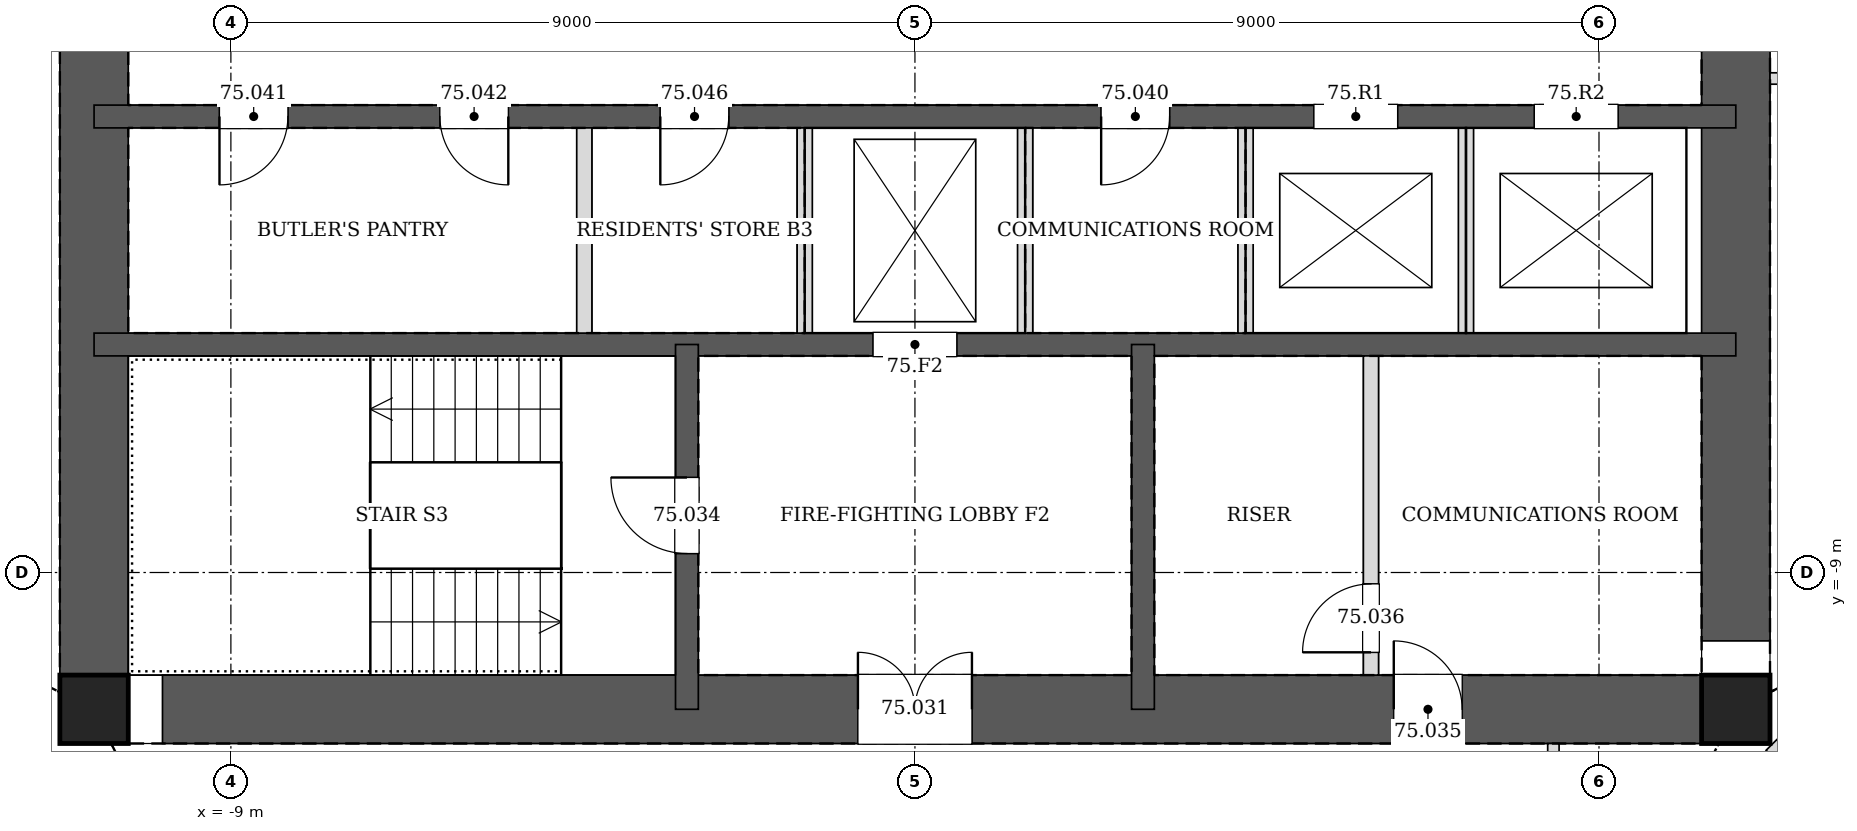
"""IFC4 building model, lengths in metres.
Left out: names, types, materials, properties, quantities, classifications, styles, units other than length and angle.
Written with IfcOpenShell. Run it as: python <this file> out.ifc"""

import sys

from ifc_helpers import new_model, si_unit, direction, frame, frame_2d, origin, origin_2d, place, context, subcontext, project, spatial, rectangle, hollow_rectangle, extrude, element, fill, save


model = new_model("IFC4")
c1 = context("Model", 3, precision=1e-05, world=origin(), true_north=direction((0.0, 1.0)))
c2 = subcontext(c1, "Body", "Model", "MODEL_VIEW")
j1 = project(units=[si_unit("LENGTHUNIT", "METRE"), si_unit("PLANEANGLEUNIT", "RADIAN")], contexts=[c1])
p1 = place(None, origin())
s1 = spatial("IfcSite", under=j1, at=p1, CompositionType="ELEMENT")
p2 = place(p1, origin())
s2 = spatial("IfcBuilding", under=s1, at=p2, CompositionType="ELEMENT")
p3 = place(p2, frame((0.0, 0.0, 304.8)))
s3 = spatial("IfcBuildingStorey", under=s2, at=p3, CompositionType="ELEMENT", Elevation=304.8)
for number, where, z_axis, x_axis in (
    (1, (-10.8, -10.8, 0.0), (0.0, 0.0, 1.0), (1.0, 0.0, 0.0)),
    (2, (10.8, -10.8, 0.0), (0.0, 0.0, 1.0), (1.0, 0.0, 0.0)),
):
    element("IfcColumn", number, at=place(p3, frame(where, z_axis=z_axis, x_axis=x_axis)), inside=s3, PredefinedType="COLUMN", context=c2, shape_type="SweptSolid", body=[
        extrude(hollow_rectangle(XDim=0.9, YDim=0.9, WallThickness=0.04, at=origin_2d()), origin(), (0.0, 0.0, 1.0), 3.4),
    ])
p4 = place(p3, frame((-10.8, -10.8, 0.0), z_axis=(0.0, 0.0, 1.0), x_axis=(1.0, 0.0, 0.0)))
e3 = element("IfcWall", 3, at=p4, inside=s3, PredefinedType="SOLIDWALL", context=c2, shape_type="SweptSolid", body=[
    extrude(rectangle(XDim=21.6, YDim=0.9, at=frame_2d((10.8, 0.0))), origin(), (0.0, 0.0, 1.0), 3.4),
])
p5 = place(p4, frame((10.05, 0.0, 0.0)))
e4 = element("IfcOpeningElement", 4, at=p5, cuts=e3, PredefinedType="OPENING", context=c2, shape_type="SweptSolid", body=[
    extrude(rectangle(XDim=1.5, YDim=2.1, at=frame_2d((0.75, 1.05))), frame((0.0, 0.46, 0.0), z_axis=(0.0, -1.0, 0.0), x_axis=(1.0, 0.0, 0.0)), (0.0, 0.0, 1.0), 0.92),
])
p6 = place(p4, frame((17.1, 0.0, 0.0)))
e5 = element("IfcOpeningElement", 5, at=p6, cuts=e3, PredefinedType="OPENING", context=c2, shape_type="SweptSolid", body=[
    extrude(rectangle(XDim=0.9, YDim=2.1, at=frame_2d((0.45, 1.05))), frame((0.0, 0.46, 0.0), z_axis=(0.0, -1.0, 0.0), x_axis=(1.0, 0.0, 0.0)), (0.0, 0.0, 1.0), 0.92),
])
p7 = place(p3, frame((10.8, -10.8, 0.0), z_axis=(0.0, 0.0, 1.0), x_axis=(0.0, 1.0, 0.0)))
e6 = element("IfcWall", 6, at=p7, inside=s3, PredefinedType="SOLIDWALL", context=c2, shape_type="SweptSolid", body=[
    extrude(rectangle(XDim=21.6, YDim=0.9, at=frame_2d((10.8, 0.0))), origin(), (0.0, 0.0, 1.0), 3.4),
])
p8 = place(p7, frame((11.7, 0.0, 0.0)))
e7 = element("IfcOpeningElement", 7, at=p8, cuts=e6, PredefinedType="OPENING", context=c2, shape_type="SweptSolid", body=[
    extrude(rectangle(XDim=1.2, YDim=2.1, at=frame_2d((0.6, 1.05))), frame((0.0, 0.46, 0.0), z_axis=(0.0, -1.0, 0.0), x_axis=(1.0, 0.0, 0.0)), (0.0, 0.0, 1.0), 0.92),
])
p9 = place(p7, frame((8.7, 0.0, 0.0)))
e8 = element("IfcOpeningElement", 8, at=p9, cuts=e6, PredefinedType="OPENING", context=c2, shape_type="SweptSolid", body=[
    extrude(rectangle(XDim=1.2, YDim=2.1, at=frame_2d((0.6, 1.05))), frame((0.0, 0.46, 0.0), z_axis=(0.0, -1.0, 0.0), x_axis=(1.0, 0.0, 0.0)), (0.0, 0.0, 1.0), 0.92),
])
p10 = place(p3, frame((-10.8, 10.8, 0.0), z_axis=(0.0, 0.0, 1.0), x_axis=(0.0, -1.0, 0.0)))
e9 = element("IfcWall", 9, at=p10, inside=s3, PredefinedType="SOLIDWALL", context=c2, shape_type="SweptSolid", body=[
    extrude(rectangle(XDim=21.6, YDim=0.9, at=frame_2d((10.8, 0.0))), origin(), (0.0, 0.0, 1.0), 3.4),
])
p11 = place(p10, frame((8.7, 0.0, 0.0)))
e10 = element("IfcOpeningElement", 10, at=p11, cuts=e9, PredefinedType="OPENING", context=c2, shape_type="SweptSolid", body=[
    extrude(rectangle(XDim=1.2, YDim=2.1, at=frame_2d((0.6, 1.05))), frame((0.0, 0.46, 0.0), z_axis=(0.0, -1.0, 0.0), x_axis=(1.0, 0.0, 0.0)), (0.0, 0.0, 1.0), 0.92),
])
p12 = place(p10, frame((11.7, 0.0, 0.0)))
e11 = element("IfcOpeningElement", 11, at=p12, cuts=e9, PredefinedType="OPENING", context=c2, shape_type="SweptSolid", body=[
    extrude(rectangle(XDim=1.2, YDim=2.1, at=frame_2d((0.6, 1.05))), frame((0.0, 0.46, 0.0), z_axis=(0.0, -1.0, 0.0), x_axis=(1.0, 0.0, 0.0)), (0.0, 0.0, 1.0), 0.92),
])
p13 = place(p3, frame((-10.8, -3.0, 0.0), z_axis=(0.0, 0.0, 1.0), x_axis=(1.0, 0.0, 0.0)))
e12 = element("IfcWall", 12, at=p13, inside=s3, PredefinedType="SOLIDWALL", context=c2, shape_type="SweptSolid", body=[
    extrude(rectangle(XDim=21.6, YDim=0.3, at=frame_2d((10.8, 0.0))), origin(), (0.0, 0.0, 1.0), 3.4),
])
p14 = place(p13, frame((13.25, 0.0, 0.0)))
e13 = element("IfcOpeningElement", 13, at=p14, cuts=e12, PredefinedType="OPENING", context=c2, shape_type="SweptSolid", body=[
    extrude(rectangle(XDim=0.9, YDim=2.1, at=frame_2d((0.45, 1.05))), frame((0.0, 0.16, 0.0), z_axis=(0.0, -1.0, 0.0), x_axis=(1.0, 0.0, 0.0)), (0.0, 0.0, 1.0), 0.32),
])
p15 = place(p13, frame((1.65, 0.0, 0.0)))
e14 = element("IfcOpeningElement", 14, at=p15, cuts=e12, PredefinedType="OPENING", context=c2, shape_type="SweptSolid", body=[
    extrude(rectangle(XDim=0.9, YDim=2.1, at=frame_2d((0.45, 1.05))), frame((0.0, 0.16, 0.0), z_axis=(0.0, -1.0, 0.0), x_axis=(1.0, 0.0, 0.0)), (0.0, 0.0, 1.0), 0.32),
])
p16 = place(p13, frame((4.55, 0.0, 0.0)))
e15 = element("IfcOpeningElement", 15, at=p16, cuts=e12, PredefinedType="OPENING", context=c2, shape_type="SweptSolid", body=[
    extrude(rectangle(XDim=0.9, YDim=2.1, at=frame_2d((0.45, 1.05))), frame((0.0, 0.16, 0.0), z_axis=(0.0, -1.0, 0.0), x_axis=(1.0, 0.0, 0.0)), (0.0, 0.0, 1.0), 0.32),
])
p17 = place(p13, frame((7.45, 0.0, 0.0)))
e16 = element("IfcOpeningElement", 16, at=p17, cuts=e12, PredefinedType="OPENING", context=c2, shape_type="SweptSolid", body=[
    extrude(rectangle(XDim=0.9, YDim=2.1, at=frame_2d((0.45, 1.05))), frame((0.0, 0.16, 0.0), z_axis=(0.0, -1.0, 0.0), x_axis=(1.0, 0.0, 0.0)), (0.0, 0.0, 1.0), 0.32),
])
p18 = place(p13, frame((16.05, 0.0, 0.0)))
e17 = element("IfcOpeningElement", 17, at=p18, cuts=e12, PredefinedType="OPENING", context=c2, shape_type="SweptSolid", body=[
    extrude(rectangle(XDim=1.1, YDim=2.1, at=frame_2d((0.55, 1.05))), frame((0.0, 0.16, 0.0), z_axis=(0.0, -1.0, 0.0), x_axis=(1.0, 0.0, 0.0)), (0.0, 0.0, 1.0), 0.32),
])
p19 = place(p13, frame((18.95, 0.0, 0.0)))
e18 = element("IfcOpeningElement", 18, at=p19, cuts=e12, PredefinedType="OPENING", context=c2, shape_type="SweptSolid", body=[
    extrude(rectangle(XDim=1.1, YDim=2.1, at=frame_2d((0.55, 1.05))), frame((0.0, 0.16, 0.0), z_axis=(0.0, -1.0, 0.0), x_axis=(1.0, 0.0, 0.0)), (0.0, 0.0, 1.0), 0.32),
])
p20 = place(p3, frame((-10.8, -6.0, 0.0), z_axis=(0.0, 0.0, 1.0), x_axis=(1.0, 0.0, 0.0)))
e19 = element("IfcWall", 19, at=p20, inside=s3, PredefinedType="SOLIDWALL", context=c2, shape_type="SweptSolid", body=[
    extrude(rectangle(XDim=21.6, YDim=0.3, at=frame_2d((10.8, 0.0))), origin(), (0.0, 0.0, 1.0), 3.4),
])
p21 = place(p20, frame((10.25, 0.0, 0.0)))
e20 = element("IfcOpeningElement", 20, at=p21, cuts=e19, PredefinedType="OPENING", context=c2, shape_type="SweptSolid", body=[
    extrude(rectangle(XDim=1.1, YDim=2.1, at=frame_2d((0.55, 1.05))), frame((0.0, 0.16, 0.0), z_axis=(0.0, -1.0, 0.0), x_axis=(1.0, 0.0, 0.0)), (0.0, 0.0, 1.0), 0.32),
])
p22 = place(p3, frame((-3.0, -6.0, 0.0), z_axis=(0.0, 0.0, 1.0), x_axis=(0.0, -1.0, 0.0)))
e21 = element("IfcWall", 21, at=p22, inside=s3, PredefinedType="SOLIDWALL", context=c2, shape_type="SweptSolid", body=[
    extrude(rectangle(XDim=4.8, YDim=0.3, at=frame_2d((2.4, 0.0))), origin(), (0.0, 0.0, 1.0), 3.4),
])
p23 = place(p22, frame((1.75, 0.0, 0.0)))
e22 = element("IfcOpeningElement", 22, at=p23, cuts=e21, PredefinedType="OPENING", context=c2, shape_type="SweptSolid", body=[
    extrude(rectangle(XDim=1.0, YDim=2.1, at=frame_2d((0.5, 1.05))), frame((0.0, 0.16, 0.0), z_axis=(0.0, -1.0, 0.0), x_axis=(1.0, 0.0, 0.0)), (0.0, 0.0, 1.0), 0.32),
])
p24 = place(p3, frame((3.0, -6.0, 0.0), z_axis=(0.0, 0.0, 1.0), x_axis=(0.0, -1.0, 0.0)))
e23 = element("IfcWall", 23, at=p24, inside=s3, PredefinedType="SOLIDWALL", context=c2, shape_type="SweptSolid", body=[
    extrude(rectangle(XDim=4.8, YDim=0.3, at=frame_2d((2.4, 0.0))), origin(), (0.0, 0.0, 1.0), 3.4),
])
for number, where, z_axis, x_axis in (
    (24, (11.25, -2.5, 0.0), (0.0, 0.0, 1.0), (1.0, 0.0, 0.0)),
    (25, (8.4, -12.9, 0.0), (0.0, 0.0, 1.0), (0.0, 1.0, 0.0)),
):
    element("IfcWall", number, at=place(p3, frame(where, z_axis=z_axis, x_axis=x_axis)), inside=s3, PredefinedType="PARTITIONING", context=c2, shape_type="SweptSolid", body=[
        extrude(rectangle(XDim=1.65, YDim=0.15, at=frame_2d((0.825, 0.0))), origin(), (0.0, 0.0, 1.0), 3.2),
    ])
p25 = place(p3, frame((11.269, -11.269, 0.0), z_axis=(0.0, 0.0, 1.0), x_axis=(0.707106781187, -0.707106781187, 0.0)))
e26 = element("IfcWall", 26, at=p25, inside=s3, PredefinedType="PARTITIONING", context=c2, shape_type="SweptSolid", body=[
    extrude(rectangle(XDim=2.315, YDim=0.2, at=frame_2d((1.158, 0.0))), origin(), (0.0, 0.0, 1.0), 2.591),
])
for number, where, z_axis, x_axis in (
    (27, (-4.35, -5.85, 0.0), (0.0, 0.0, 1.0), (0.0, 1.0, 0.0)),
    (28, (-1.45, -5.85, 0.0), (0.0, 0.0, 1.0), (0.0, 1.0, 0.0)),
    (29, (1.45, -5.85, 0.0), (0.0, 0.0, 1.0), (0.0, 1.0, 0.0)),
    (30, (4.35, -5.85, 0.0), (0.0, 0.0, 1.0), (0.0, 1.0, 0.0)),
):
    element("IfcWall", number, at=place(p3, frame(where, z_axis=z_axis, x_axis=x_axis)), inside=s3, PredefinedType="PARTITIONING", context=c2, shape_type="SweptSolid", body=[
        extrude(rectangle(XDim=2.7, YDim=0.2, at=frame_2d((1.35, 0.0))), origin(), (0.0, 0.0, 1.0), 3.2),
    ])
p26 = place(p3, frame((7.25, -5.85, 0.0), z_axis=(0.0, 0.0, 1.0), x_axis=(0.0, 1.0, 0.0)))
e31 = element("IfcWall", 31, at=p26, inside=s3, PredefinedType="PARTITIONING", context=c2, shape_type="SweptSolid", body=[
    extrude(rectangle(XDim=2.7, YDim=0.2, at=frame_2d((1.35, 0.0))), origin(), (0.0, 0.0, 1.0), 3.4),
])
p27 = place(p3, frame((6.0, -10.35, 0.0), z_axis=(0.0, 0.0, 1.0), x_axis=(0.0, 1.0, 0.0)))
e32 = element("IfcWall", 32, at=p27, inside=s3, PredefinedType="PARTITIONING", context=c2, shape_type="SweptSolid", body=[
    extrude(rectangle(XDim=4.2, YDim=0.2, at=frame_2d((2.1, 0.0))), origin(), (0.0, 0.0, 1.0), 3.2),
])
p28 = place(p27, frame((0.3, 0.0, 0.0)))
e33 = element("IfcOpeningElement", 33, at=p28, cuts=e32, PredefinedType="OPENING", context=c2, shape_type="SweptSolid", body=[
    extrude(rectangle(XDim=0.9, YDim=2.1, at=frame_2d((0.45, 1.05))), frame((0.0, 0.11, 0.0), z_axis=(0.0, -1.0, 0.0), x_axis=(1.0, 0.0, 0.0)), (0.0, 0.0, 1.0), 0.22),
])
p29 = place(p5, origin())
e34 = element("IfcDoor", 34, at=p29, inside=s3, OperationType="DOUBLE_DOOR_SINGLE_SWING", PredefinedType="DOOR", context=c2, shape_type="SweptSolid", body=[
    extrude(rectangle(XDim=1.5, YDim=2.1, at=frame_2d((0.75, 1.05))), frame((0.0, 0.025, 0.0), z_axis=(0.0, -1.0, 0.0), x_axis=(1.0, 0.0, 0.0)), (0.0, 0.0, 1.0), 0.05),
])
fill(e4, e34)
p30 = place(p23, frame((1.0, 0.0, 0.0), z_axis=(0.0, 0.0, 1.0), x_axis=(-1.0, 0.0, 0.0)))
e35 = element("IfcDoor", 35, at=p30, inside=s3, OperationType="SINGLE_SWING_RIGHT", PredefinedType="DOOR", context=c2, shape_type="SweptSolid", body=[
    extrude(rectangle(XDim=1.0, YDim=2.1, at=frame_2d((0.5, 1.05))), frame((0.0, 0.025, 0.0), z_axis=(0.0, -1.0, 0.0), x_axis=(1.0, 0.0, 0.0)), (0.0, 0.0, 1.0), 0.05),
])
fill(e22, e35)
p31 = place(p6, origin())
e36 = element("IfcDoor", 36, at=p31, inside=s3, OperationType="SINGLE_SWING_LEFT", PredefinedType="DOOR", context=c2, shape_type="SweptSolid", body=[
    extrude(rectangle(XDim=0.9, YDim=2.1, at=frame_2d((0.45, 1.05))), frame((0.0, 0.025, 0.0), z_axis=(0.0, -1.0, 0.0), x_axis=(1.0, 0.0, 0.0)), (0.0, 0.0, 1.0), 0.05),
])
fill(e5, e36)
p32 = place(p28, origin())
e37 = element("IfcDoor", 37, at=p32, inside=s3, OperationType="SINGLE_SWING_LEFT", PredefinedType="DOOR", context=c2, shape_type="SweptSolid", body=[
    extrude(rectangle(XDim=0.9, YDim=2.1, at=frame_2d((0.45, 1.05))), frame((0.0, 0.025, 0.0), z_axis=(0.0, -1.0, 0.0), x_axis=(1.0, 0.0, 0.0)), (0.0, 0.0, 1.0), 0.05),
])
fill(e33, e37)
p33 = place(p14, frame((0.9, 0.0, 0.0), z_axis=(0.0, 0.0, 1.0), x_axis=(-1.0, 0.0, 0.0)))
e38 = element("IfcDoor", 38, at=p33, inside=s3, OperationType="SINGLE_SWING_RIGHT", PredefinedType="DOOR", context=c2, shape_type="SweptSolid", body=[
    extrude(rectangle(XDim=0.9, YDim=2.1, at=frame_2d((0.45, 1.05))), frame((0.0, 0.025, 0.0), z_axis=(0.0, -1.0, 0.0), x_axis=(1.0, 0.0, 0.0)), (0.0, 0.0, 1.0), 0.05),
])
fill(e13, e38)
p34 = place(p15, frame((0.9, 0.0, 0.0), z_axis=(0.0, 0.0, 1.0), x_axis=(-1.0, 0.0, 0.0)))
e39 = element("IfcDoor", 39, at=p34, inside=s3, OperationType="SINGLE_SWING_RIGHT", PredefinedType="DOOR", context=c2, shape_type="SweptSolid", body=[
    extrude(rectangle(XDim=0.9, YDim=2.1, at=frame_2d((0.45, 1.05))), frame((0.0, 0.025, 0.0), z_axis=(0.0, -1.0, 0.0), x_axis=(1.0, 0.0, 0.0)), (0.0, 0.0, 1.0), 0.05),
])
fill(e14, e39)
p35 = place(p16, frame((0.9, 0.0, 0.0), z_axis=(0.0, 0.0, 1.0), x_axis=(-1.0, 0.0, 0.0)))
e40 = element("IfcDoor", 40, at=p35, inside=s3, OperationType="SINGLE_SWING_LEFT", PredefinedType="DOOR", context=c2, shape_type="SweptSolid", body=[
    extrude(rectangle(XDim=0.9, YDim=2.1, at=frame_2d((0.45, 1.05))), frame((0.0, 0.025, 0.0), z_axis=(0.0, -1.0, 0.0), x_axis=(1.0, 0.0, 0.0)), (0.0, 0.0, 1.0), 0.05),
])
fill(e15, e40)
p36 = place(p17, frame((0.9, 0.0, 0.0), z_axis=(0.0, 0.0, 1.0), x_axis=(-1.0, 0.0, 0.0)))
e41 = element("IfcDoor", 41, at=p36, inside=s3, OperationType="SINGLE_SWING_RIGHT", PredefinedType="DOOR", context=c2, shape_type="SweptSolid", body=[
    extrude(rectangle(XDim=0.9, YDim=2.1, at=frame_2d((0.45, 1.05))), frame((0.0, 0.025, 0.0), z_axis=(0.0, -1.0, 0.0), x_axis=(1.0, 0.0, 0.0)), (0.0, 0.0, 1.0), 0.05),
])
fill(e16, e41)
p37 = place(p21, origin())
e42 = element("IfcDoor", 42, at=p37, inside=s3, OperationType="DOUBLE_DOOR_SLIDING", PredefinedType="DOOR", context=c2, shape_type="SweptSolid", body=[
    extrude(rectangle(XDim=1.1, YDim=2.1, at=frame_2d((0.55, 1.05))), frame((0.0, 0.025, 0.0), z_axis=(0.0, -1.0, 0.0), x_axis=(1.0, 0.0, 0.0)), (0.0, 0.0, 1.0), 0.05),
])
fill(e20, e42)
p38 = place(p18, origin())
e43 = element("IfcDoor", 43, at=p38, inside=s3, OperationType="DOUBLE_DOOR_SLIDING", PredefinedType="DOOR", context=c2, shape_type="SweptSolid", body=[
    extrude(rectangle(XDim=1.1, YDim=2.1, at=frame_2d((0.55, 1.05))), frame((0.0, 0.025, 0.0), z_axis=(0.0, -1.0, 0.0), x_axis=(1.0, 0.0, 0.0)), (0.0, 0.0, 1.0), 0.05),
])
fill(e17, e43)
p39 = place(p19, origin())
e44 = element("IfcDoor", 44, at=p39, inside=s3, OperationType="DOUBLE_DOOR_SLIDING", PredefinedType="DOOR", context=c2, shape_type="SweptSolid", body=[
    extrude(rectangle(XDim=1.1, YDim=2.1, at=frame_2d((0.55, 1.05))), frame((0.0, 0.025, 0.0), z_axis=(0.0, -1.0, 0.0), x_axis=(1.0, 0.0, 0.0)), (0.0, 0.0, 1.0), 0.05),
])
fill(e18, e44)
save(model, sys.argv[1])
